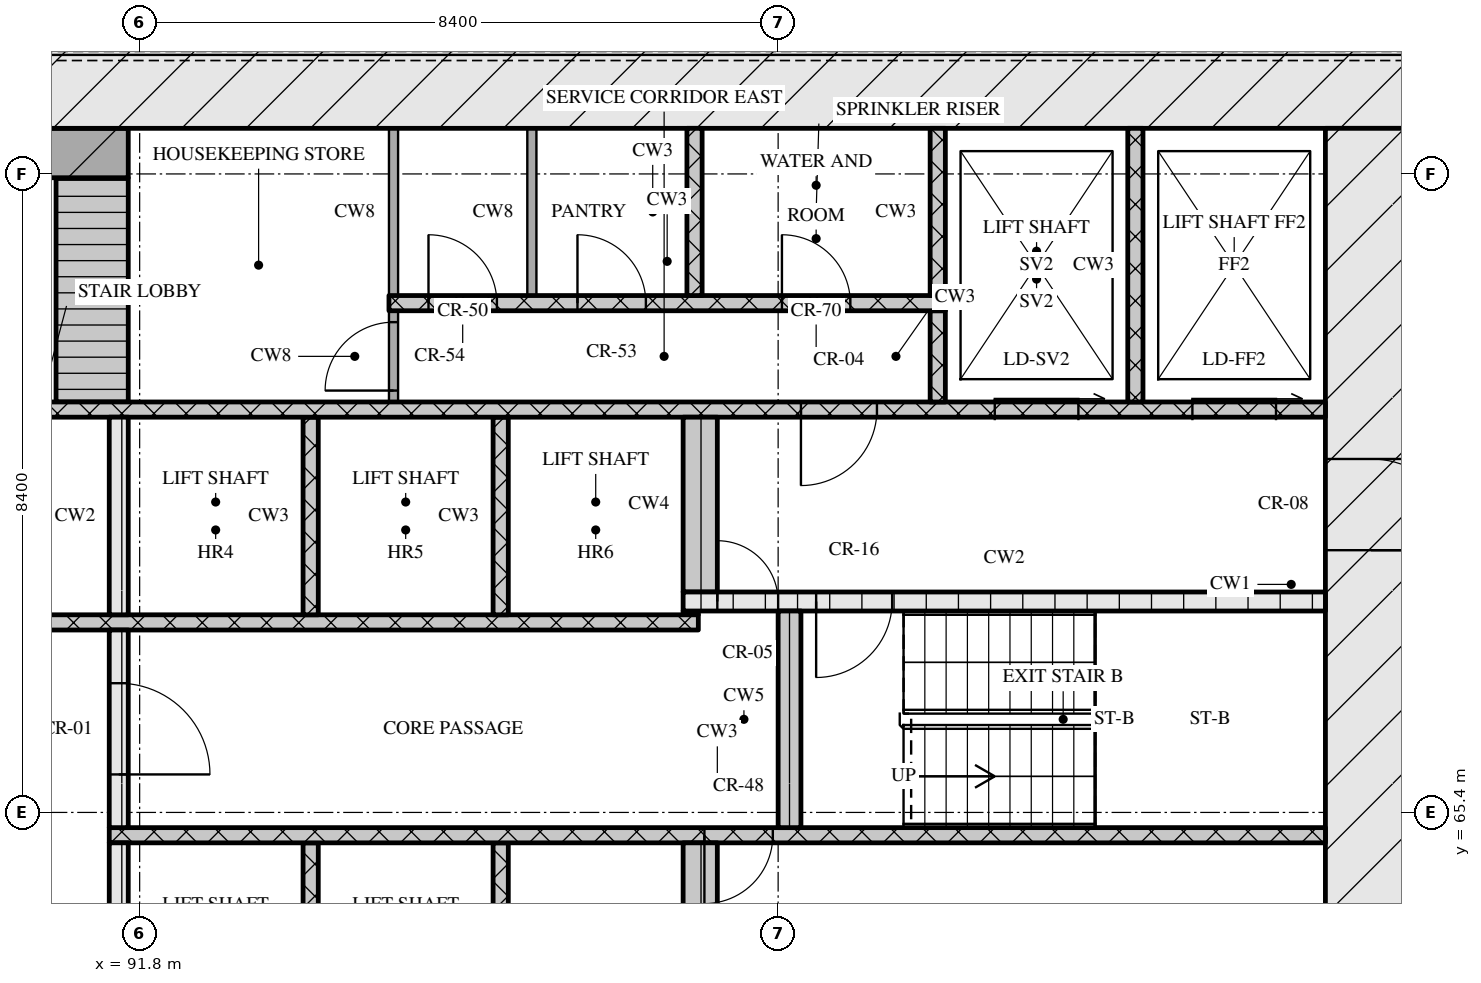
"""IFC4 building model, lengths in metres.
Left out: names, types, materials, properties, quantities, classifications, styles, units other than length and angle.
Written with IfcOpenShell. Run it as: python <this file> out.ifc"""

import sys

from ifc_helpers import new_model, si_unit, direction, frame, frame_2d, origin, place, context, subcontext, project, spatial, rectangle, extrude, element, fill, save


model = new_model("IFC4")
c1 = context("Model", 3, precision=1e-05, world=origin(), true_north=direction((0.0, 1.0)))
c2 = subcontext(c1, "Body", "Model", "MODEL_VIEW")
j1 = project(units=[si_unit("LENGTHUNIT", "METRE"), si_unit("PLANEANGLEUNIT", "RADIAN")], contexts=[c1])
p1 = place(None, origin())
s1 = spatial("IfcSite", under=j1, at=p1, CompositionType="ELEMENT")
p2 = place(p1, origin())
s2 = spatial("IfcBuilding", under=s1, at=p2, CompositionType="ELEMENT")
p3 = place(p2, frame((0.0, 0.0, 58.8)))
s3 = spatial("IfcBuildingStorey", under=s2, at=p3, CompositionType="ELEMENT", Elevation=58.8)
p4 = place(p3, frame((66.6, 75.0, 0.0), z_axis=(0.0, 0.0, 1.0), x_axis=(1.0, 0.0, 0.0)))
e1 = element("IfcWall", 1, at=p4, inside=s3, PredefinedType="SOLIDWALL", context=c2, shape_type="SweptSolid", body=[
    extrude(rectangle(XDim=42.0, YDim=1.2, at=frame_2d((21.0, 0.0))), origin(), (0.0, 0.0, 1.0), 3.32),
])
p5 = place(p3, frame((108.0, 62.4, 0.0), z_axis=(0.0, 0.0, 1.0), x_axis=(0.0, 1.0, 0.0)))
e2 = element("IfcWall", 2, at=p5, inside=s3, PredefinedType="SOLIDWALL", context=c2, shape_type="SweptSolid", body=[
    extrude(rectangle(XDim=12.0, YDim=1.2, at=frame_2d((6.0, 0.0))), origin(), (0.0, 0.0, 1.0), 3.32),
])
p6 = place(p5, frame((6.45, 0.0, 0.0)))
e3 = element("IfcOpeningElement", 3, at=p6, cuts=e2, PredefinedType="OPENING", context=c2, shape_type="SweptSolid", body=[
    extrude(rectangle(XDim=1.2, YDim=2.1, at=frame_2d((0.6, 1.05))), frame((0.0, 0.61, 0.0), z_axis=(0.0, -1.0, 0.0), x_axis=(1.0, 0.0, 0.0)), (0.0, 0.0, 1.0), 1.22),
])
p7 = place(p3, frame((91.525, 62.4, 0.0), z_axis=(0.0, 0.0, 1.0), x_axis=(0.0, 1.0, 0.0)))
e4 = element("IfcWall", 4, at=p7, inside=s3, PredefinedType="SOLIDWALL", context=c2, shape_type="SweptSolid", body=[
    extrude(rectangle(XDim=2.6, YDim=0.25, at=frame_2d((1.3, 0.0))), origin(), (0.0, 0.0, 1.0), 3.32),
])
for number, where, z_axis, x_axis in (
    (5, (94.05, 62.4, 0.0), (0.0, 0.0, 1.0), (0.0, 1.0, 0.0)),
    (6, (96.55, 62.4, 0.0), (0.0, 0.0, 1.0), (0.0, 1.0, 0.0)),
):
    element("IfcWall", number, at=place(p3, frame(where, z_axis=z_axis, x_axis=x_axis)), inside=s3, PredefinedType="SOLIDWALL", context=c2, shape_type="SweptSolid", body=[
        extrude(rectangle(XDim=2.6, YDim=0.2, at=frame_2d((1.3, 0.0))), origin(), (0.0, 0.0, 1.0), 3.32),
    ])
p8 = place(p3, frame((99.175, 62.4, 0.0), z_axis=(0.0, 0.0, 1.0), x_axis=(0.0, 1.0, 0.0)))
e7 = element("IfcWall", 7, at=p8, inside=s3, PredefinedType="SOLIDWALL", context=c2, shape_type="SweptSolid", body=[
    extrude(rectangle(XDim=2.6, YDim=0.45, at=frame_2d((1.3, 0.0))), origin(), (0.0, 0.0, 1.0), 3.32),
])
p9 = place(p3, frame((91.4, 65.1, 0.0), z_axis=(0.0, 0.0, 1.0), x_axis=(1.0, 0.0, 0.0)))
e8 = element("IfcWall", 8, at=p9, inside=s3, PredefinedType="SOLIDWALL", context=c2, shape_type="SweptSolid", body=[
    extrude(rectangle(XDim=16.0, YDim=0.2, at=frame_2d((8.0, 0.0))), origin(), (0.0, 0.0, 1.0), 3.32),
])
p10 = place(p9, frame((7.83, 0.0, 0.0)))
e9 = element("IfcOpeningElement", 9, at=p10, cuts=e8, PredefinedType="OPENING", context=c2, shape_type="SweptSolid", body=[
    extrude(rectangle(XDim=0.9, YDim=2.1, at=frame_2d((0.45, 1.05))), frame((0.0, 0.11, 0.0), z_axis=(0.0, -1.0, 0.0), x_axis=(1.0, 0.0, 0.0)), (0.0, 0.0, 1.0), 0.22),
])
p11 = place(p3, frame((91.525, 65.2, 0.0), z_axis=(0.0, 0.0, 1.0), x_axis=(0.0, 1.0, 0.0)))
e10 = element("IfcWall", 10, at=p11, inside=s3, PredefinedType="SOLIDWALL", context=c2, shape_type="SweptSolid", body=[
    extrude(rectangle(XDim=2.6, YDim=0.25, at=frame_2d((1.3, 0.0))), origin(), (0.0, 0.0, 1.0), 3.32),
])
p12 = place(p11, frame((0.7, 0.0, 0.0)))
e11 = element("IfcOpeningElement", 11, at=p12, cuts=e10, PredefinedType="OPENING", context=c2, shape_type="SweptSolid", body=[
    extrude(rectangle(XDim=1.2, YDim=2.1, at=frame_2d((0.6, 1.05))), frame((0.0, 0.135, 0.0), z_axis=(0.0, -1.0, 0.0), x_axis=(1.0, 0.0, 0.0)), (0.0, 0.0, 1.0), 0.27),
])
p13 = place(p3, frame((100.35, 65.2, 0.0), z_axis=(0.0, 0.0, 1.0), x_axis=(0.0, 1.0, 0.0)))
e12 = element("IfcWall", 12, at=p13, inside=s3, PredefinedType="SOLIDWALL", context=c2, shape_type="SweptSolid", body=[
    extrude(rectangle(XDim=2.85, YDim=0.3, at=frame_2d((1.425, 0.0))), origin(), (0.0, 0.0, 1.0), 3.32),
])
p14 = place(p3, frame((76.05, 67.9, 0.0), z_axis=(0.0, 0.0, 1.0), x_axis=(1.0, 0.0, 0.0)))
e13 = element("IfcWall", 13, at=p14, inside=s3, PredefinedType="SOLIDWALL", context=c2, shape_type="SweptSolid", body=[
    extrude(rectangle(XDim=23.1, YDim=0.2, at=frame_2d((11.55, 0.0))), origin(), (0.0, 0.0, 1.0), 3.32),
])
p15 = place(p14, frame((0.6, 0.0, 0.0)))
e14 = element("IfcOpeningElement", 14, at=p15, cuts=e13, PredefinedType="OPENING", context=c2, shape_type="SweptSolid", body=[
    extrude(rectangle(XDim=1.1, YDim=2.1, at=frame_2d((0.55, 1.05))), frame((0.0, 0.11, 0.0), z_axis=(0.0, -1.0, 0.0), x_axis=(1.0, 0.0, 0.0)), (0.0, 0.0, 1.0), 0.22),
])
p16 = place(p14, frame((3.1, 0.0, 0.0)))
e15 = element("IfcOpeningElement", 15, at=p16, cuts=e13, PredefinedType="OPENING", context=c2, shape_type="SweptSolid", body=[
    extrude(rectangle(XDim=1.1, YDim=2.1, at=frame_2d((0.55, 1.05))), frame((0.0, 0.11, 0.0), z_axis=(0.0, -1.0, 0.0), x_axis=(1.0, 0.0, 0.0)), (0.0, 0.0, 1.0), 0.22),
])
p17 = place(p14, frame((5.6, 0.0, 0.0)))
e16 = element("IfcOpeningElement", 16, at=p17, cuts=e13, PredefinedType="OPENING", context=c2, shape_type="SweptSolid", body=[
    extrude(rectangle(XDim=1.1, YDim=2.1, at=frame_2d((0.55, 1.05))), frame((0.0, 0.11, 0.0), z_axis=(0.0, -1.0, 0.0), x_axis=(1.0, 0.0, 0.0)), (0.0, 0.0, 1.0), 0.22),
])
p18 = place(p14, frame((8.45, 0.0, 0.0)))
e17 = element("IfcOpeningElement", 17, at=p18, cuts=e13, PredefinedType="OPENING", context=c2, shape_type="SweptSolid", body=[
    extrude(rectangle(XDim=0.9, YDim=2.1, at=frame_2d((0.45, 1.05))), frame((0.0, 0.11, 0.0), z_axis=(0.0, -1.0, 0.0), x_axis=(1.0, 0.0, 0.0)), (0.0, 0.0, 1.0), 0.22),
])
p19 = place(p14, frame((10.91, 0.0, 0.0)))
e18 = element("IfcOpeningElement", 18, at=p19, cuts=e13, PredefinedType="OPENING", context=c2, shape_type="SweptSolid", body=[
    extrude(rectangle(XDim=0.9, YDim=2.1, at=frame_2d((0.45, 1.05))), frame((0.0, 0.11, 0.0), z_axis=(0.0, -1.0, 0.0), x_axis=(1.0, 0.0, 0.0)), (0.0, 0.0, 1.0), 0.22),
])
p20 = place(p14, frame((13.55, 0.0, 0.0)))
e19 = element("IfcOpeningElement", 19, at=p20, cuts=e13, PredefinedType="OPENING", context=c2, shape_type="SweptSolid", body=[
    extrude(rectangle(XDim=1.0, YDim=2.1, at=frame_2d((0.5, 1.05))), frame((0.0, 0.11, 0.0), z_axis=(0.0, -1.0, 0.0), x_axis=(1.0, 0.0, 0.0)), (0.0, 0.0, 1.0), 0.22),
])
p21 = place(p3, frame((91.525, 68.0, 0.0), z_axis=(0.0, 0.0, 1.0), x_axis=(0.0, 1.0, 0.0)))
e20 = element("IfcWall", 20, at=p21, inside=s3, PredefinedType="SOLIDWALL", context=c2, shape_type="SweptSolid", body=[
    extrude(rectangle(XDim=2.6, YDim=0.25, at=frame_2d((1.3, 0.0))), origin(), (0.0, 0.0, 1.0), 3.32),
])
for number, where, z_axis, x_axis in (
    (21, (94.05, 68.0, 0.0), (0.0, 0.0, 1.0), (0.0, 1.0, 0.0)),
    (22, (96.55, 68.0, 0.0), (0.0, 0.0, 1.0), (0.0, 1.0, 0.0)),
):
    element("IfcWall", number, at=place(p3, frame(where, z_axis=z_axis, x_axis=x_axis)), inside=s3, PredefinedType="SOLIDWALL", context=c2, shape_type="SweptSolid", body=[
        extrude(rectangle(XDim=2.6, YDim=0.2, at=frame_2d((1.3, 0.0))), origin(), (0.0, 0.0, 1.0), 3.32),
    ])
p22 = place(p3, frame((98.95, 68.025, 0.0), z_axis=(0.0, 0.0, 1.0), x_axis=(1.0, 0.0, 0.0)))
e23 = element("IfcWall", 23, at=p22, inside=s3, PredefinedType="SOLIDWALL", context=c2, shape_type="SweptSolid", body=[
    extrude(rectangle(XDim=0.2, YDim=0.05, at=frame_2d((0.1, 0.0))), origin(), (0.0, 0.0, 1.0), 3.32),
])
p23 = place(p3, frame((98.95, 68.175, 0.0), z_axis=(0.0, 0.0, 1.0), x_axis=(1.0, 0.0, 0.0)))
e24 = element("IfcWall", 24, at=p23, inside=s3, PredefinedType="SOLIDWALL", context=c2, shape_type="SweptSolid", body=[
    extrude(rectangle(XDim=8.45, YDim=0.25, at=frame_2d((4.225, 0.0))), origin(), (0.0, 0.0, 1.0), 3.32),
])
p24 = place(p23, frame((0.45, 0.0, 0.0)))
e25 = element("IfcOpeningElement", 25, at=p24, cuts=e24, PredefinedType="OPENING", context=c2, shape_type="SweptSolid", body=[
    extrude(rectangle(XDim=0.8, YDim=2.1, at=frame_2d((0.4, 1.05))), frame((0.0, 0.135, 0.0), z_axis=(0.0, -1.0, 0.0), x_axis=(1.0, 0.0, 0.0)), (0.0, 0.0, 1.0), 0.27),
])
p25 = place(p23, frame((1.75, 0.0, 0.0)))
e26 = element("IfcOpeningElement", 26, at=p25, cuts=e24, PredefinedType="OPENING", context=c2, shape_type="SweptSolid", body=[
    extrude(rectangle(XDim=1.0, YDim=2.1, at=frame_2d((0.5, 1.05))), frame((0.0, 0.135, 0.0), z_axis=(0.0, -1.0, 0.0), x_axis=(1.0, 0.0, 0.0)), (0.0, 0.0, 1.0), 0.27),
])
p26 = place(p3, frame((99.175, 68.3, 0.0), z_axis=(0.0, 0.0, 1.0), x_axis=(0.0, 1.0, 0.0)))
e27 = element("IfcWall", 27, at=p26, inside=s3, PredefinedType="SOLIDWALL", context=c2, shape_type="SweptSolid", body=[
    extrude(rectangle(XDim=2.3, YDim=0.45, at=frame_2d((1.15, 0.0))), origin(), (0.0, 0.0, 1.0), 3.32),
])
p27 = place(p3, frame((67.8, 70.7, 0.0), z_axis=(0.0, 0.0, 1.0), x_axis=(1.0, 0.0, 0.0)))
e28 = element("IfcWall", 28, at=p27, inside=s3, PredefinedType="SOLIDWALL", context=c2, shape_type="SweptSolid", body=[
    extrude(rectangle(XDim=39.6, YDim=0.2, at=frame_2d((19.8, 0.0))), origin(), (0.0, 0.0, 1.0), 3.32),
])
p28 = place(p27, frame((0.65, 0.0, 0.0)))
e29 = element("IfcOpeningElement", 29, at=p28, cuts=e28, PredefinedType="OPENING", context=c2, shape_type="SweptSolid", body=[
    extrude(rectangle(XDim=1.1, YDim=2.1, at=frame_2d((0.55, 1.05))), frame((0.0, 0.11, 0.0), z_axis=(0.0, -1.0, 0.0), x_axis=(1.0, 0.0, 0.0)), (0.0, 0.0, 1.0), 0.22),
])
p29 = place(p27, frame((3.25, 0.0, 0.0)))
e30 = element("IfcOpeningElement", 30, at=p29, cuts=e28, PredefinedType="OPENING", context=c2, shape_type="SweptSolid", body=[
    extrude(rectangle(XDim=1.1, YDim=2.1, at=frame_2d((0.55, 1.05))), frame((0.0, 0.11, 0.0), z_axis=(0.0, -1.0, 0.0), x_axis=(1.0, 0.0, 0.0)), (0.0, 0.0, 1.0), 0.22),
])
p30 = place(p27, frame((5.9, 0.0, 0.0)))
e31 = element("IfcOpeningElement", 31, at=p30, cuts=e28, PredefinedType="OPENING", context=c2, shape_type="SweptSolid", body=[
    extrude(rectangle(XDim=1.0, YDim=2.1, at=frame_2d((0.5, 1.05))), frame((0.0, 0.11, 0.0), z_axis=(0.0, -1.0, 0.0), x_axis=(1.0, 0.0, 0.0)), (0.0, 0.0, 1.0), 0.22),
])
p31 = place(p27, frame((21.7, 0.0, 0.0)))
e32 = element("IfcOpeningElement", 32, at=p31, cuts=e28, PredefinedType="OPENING", context=c2, shape_type="SweptSolid", body=[
    extrude(rectangle(XDim=1.0, YDim=2.1, at=frame_2d((0.5, 1.05))), frame((0.0, 0.11, 0.0), z_axis=(0.0, -1.0, 0.0), x_axis=(1.0, 0.0, 0.0)), (0.0, 0.0, 1.0), 0.22),
])
p32 = place(p27, frame((32.7, 0.0, 0.0)))
e33 = element("IfcOpeningElement", 33, at=p32, cuts=e28, PredefinedType="OPENING", context=c2, shape_type="SweptSolid", body=[
    extrude(rectangle(XDim=1.0, YDim=2.1, at=frame_2d((0.5, 1.05))), frame((0.0, 0.11, 0.0), z_axis=(0.0, -1.0, 0.0), x_axis=(1.0, 0.0, 0.0)), (0.0, 0.0, 1.0), 0.22),
])
p33 = place(p27, frame((35.25, 0.0, 0.0)))
e34 = element("IfcOpeningElement", 34, at=p33, cuts=e28, PredefinedType="OPENING", context=c2, shape_type="SweptSolid", body=[
    extrude(rectangle(XDim=1.1, YDim=2.1, at=frame_2d((0.55, 1.05))), frame((0.0, 0.11, 0.0), z_axis=(0.0, -1.0, 0.0), x_axis=(1.0, 0.0, 0.0)), (0.0, 0.0, 1.0), 0.22),
])
p34 = place(p27, frame((37.85, 0.0, 0.0)))
e35 = element("IfcOpeningElement", 35, at=p34, cuts=e28, PredefinedType="OPENING", context=c2, shape_type="SweptSolid", body=[
    extrude(rectangle(XDim=1.1, YDim=2.1, at=frame_2d((0.55, 1.05))), frame((0.0, 0.11, 0.0), z_axis=(0.0, -1.0, 0.0), x_axis=(1.0, 0.0, 0.0)), (0.0, 0.0, 1.0), 0.22),
])
p35 = place(p3, frame((91.175, 70.8, 0.0), z_axis=(0.0, 0.0, 1.0), x_axis=(0.0, 1.0, 0.0)))
e36 = element("IfcWall", 36, at=p35, inside=s3, PredefinedType="SOLIDWALL", context=c2, shape_type="SweptSolid", body=[
    extrude(rectangle(XDim=2.95, YDim=0.95, at=frame_2d((1.475, 0.0))), origin(), (0.0, 0.0, 1.0), 3.32),
])
p36 = place(p3, frame((95.14, 70.8, 0.0), z_axis=(0.0, 0.0, 1.0), x_axis=(0.0, 1.0, 0.0)))
e37 = element("IfcWall", 37, at=p36, inside=s3, PredefinedType="PARTITIONING", context=c2, shape_type="SweptSolid", body=[
    extrude(rectangle(XDim=1.2, YDim=0.12, at=frame_2d((0.6, 0.0))), origin(), (0.0, 0.0, 1.0), 3.32),
])
p37 = place(p36, frame((0.15, 0.0, 0.0)))
e38 = element("IfcOpeningElement", 38, at=p37, cuts=e37, PredefinedType="OPENING", context=c2, shape_type="SweptSolid", body=[
    extrude(rectangle(XDim=0.9, YDim=2.1, at=frame_2d((0.45, 1.05))), frame((0.0, 0.07, 0.0), z_axis=(0.0, -1.0, 0.0), x_axis=(1.0, 0.0, 0.0)), (0.0, 0.0, 1.0), 0.14),
])
p38 = place(p3, frame((102.3, 70.8, 0.0), z_axis=(0.0, 0.0, 1.0), x_axis=(0.0, 1.0, 0.0)))
e39 = element("IfcWall", 39, at=p38, inside=s3, PredefinedType="SOLIDWALL", context=c2, shape_type="SweptSolid", body=[
    extrude(rectangle(XDim=1.2, YDim=0.2, at=frame_2d((0.6, 0.0))), origin(), (0.0, 0.0, 1.0), 3.32),
])
p39 = place(p3, frame((104.9, 70.8, 0.0), z_axis=(0.0, 0.0, 1.0), x_axis=(0.0, 1.0, 0.0)))
e40 = element("IfcWall", 40, at=p39, inside=s3, PredefinedType="SOLIDWALL", context=c2, shape_type="SweptSolid", body=[
    extrude(rectangle(XDim=3.6, YDim=0.2, at=frame_2d((1.8, 0.0))), origin(), (0.0, 0.0, 1.0), 3.32),
])
p40 = place(p3, frame((95.08, 72.1, 0.0), z_axis=(0.0, 0.0, 1.0), x_axis=(1.0, 0.0, 0.0)))
e41 = element("IfcWall", 41, at=p40, inside=s3, PredefinedType="SOLIDWALL", context=c2, shape_type="SweptSolid", body=[
    extrude(rectangle(XDim=7.32, YDim=0.2, at=frame_2d((3.66, 0.0))), origin(), (0.0, 0.0, 1.0), 3.32),
])
p41 = place(p40, frame((0.52, 0.0, 0.0)))
e42 = element("IfcOpeningElement", 42, at=p41, cuts=e41, PredefinedType="OPENING", context=c2, shape_type="SweptSolid", body=[
    extrude(rectangle(XDim=0.9, YDim=2.1, at=frame_2d((0.45, 1.05))), frame((0.0, 0.11, 0.0), z_axis=(0.0, -1.0, 0.0), x_axis=(1.0, 0.0, 0.0)), (0.0, 0.0, 1.0), 0.22),
])
p42 = place(p40, frame((2.48, 0.0, 0.0)))
e43 = element("IfcOpeningElement", 43, at=p42, cuts=e41, PredefinedType="OPENING", context=c2, shape_type="SweptSolid", body=[
    extrude(rectangle(XDim=0.9, YDim=2.1, at=frame_2d((0.45, 1.05))), frame((0.0, 0.11, 0.0), z_axis=(0.0, -1.0, 0.0), x_axis=(1.0, 0.0, 0.0)), (0.0, 0.0, 1.0), 0.22),
])
p43 = place(p40, frame((5.17, 0.0, 0.0)))
e44 = element("IfcOpeningElement", 44, at=p43, cuts=e41, PredefinedType="OPENING", context=c2, shape_type="SweptSolid", body=[
    extrude(rectangle(XDim=0.9, YDim=2.1, at=frame_2d((0.45, 1.05))), frame((0.0, 0.11, 0.0), z_axis=(0.0, -1.0, 0.0), x_axis=(1.0, 0.0, 0.0)), (0.0, 0.0, 1.0), 0.22),
])
for number, where, z_axis, x_axis in (
    (45, (95.14, 72.2, 0.0), (0.0, 0.0, 1.0), (0.0, 1.0, 0.0)),
    (46, (96.96, 72.2, 0.0), (0.0, 0.0, 1.0), (0.0, 1.0, 0.0)),
):
    element("IfcWall", number, at=place(p3, frame(where, z_axis=z_axis, x_axis=x_axis)), inside=s3, PredefinedType="PARTITIONING", context=c2, shape_type="SweptSolid", body=[
        extrude(rectangle(XDim=2.2, YDim=0.12, at=frame_2d((1.1, 0.0))), origin(), (0.0, 0.0, 1.0), 3.32),
    ])
for number, where, z_axis, x_axis in (
    (47, (99.1, 72.2, 0.0), (0.0, 0.0, 1.0), (0.0, 1.0, 0.0)),
    (48, (102.3, 72.2, 0.0), (0.0, 0.0, 1.0), (0.0, 1.0, 0.0)),
):
    element("IfcWall", number, at=place(p3, frame(where, z_axis=z_axis, x_axis=x_axis)), inside=s3, PredefinedType="SOLIDWALL", context=c2, shape_type="SweptSolid", body=[
        extrude(rectangle(XDim=2.2, YDim=0.2, at=frame_2d((1.1, 0.0))), origin(), (0.0, 0.0, 1.0), 3.32),
    ])
p44 = place(p3, frame((83.55, 74.075, 0.0), z_axis=(0.0, 0.0, 1.0), x_axis=(1.0, 0.0, 0.0)))
e49 = element("IfcWall", 49, at=p44, inside=s3, PredefinedType="SOLIDWALL", context=c2, shape_type="SweptSolid", body=[
    extrude(rectangle(XDim=8.1, YDim=0.65, at=frame_2d((4.05, 0.0))), origin(), (0.0, 0.0, 1.0), 3.32),
])
p45 = place(p10, origin())
e50 = element("IfcDoor", 50, at=p45, inside=s3, OperationType="SINGLE_SWING_RIGHT", PredefinedType="DOOR", context=c2, shape_type="SweptSolid", body=[
    extrude(rectangle(XDim=0.9, YDim=2.1, at=frame_2d((0.45, 1.05))), frame((0.0, 0.025, 0.0), z_axis=(0.0, -1.0, 0.0), x_axis=(1.0, 0.0, 0.0)), (0.0, 0.0, 1.0), 0.05),
])
fill(e9, e50)
p46 = place(p12, origin())
e51 = element("IfcDoor", 51, at=p46, inside=s3, OperationType="SINGLE_SWING_RIGHT", PredefinedType="DOOR", context=c2, shape_type="SweptSolid", body=[
    extrude(rectangle(XDim=1.2, YDim=2.1, at=frame_2d((0.6, 1.05))), frame((0.0, 0.025, 0.0), z_axis=(0.0, -1.0, 0.0), x_axis=(1.0, 0.0, 0.0)), (0.0, 0.0, 1.0), 0.05),
])
fill(e11, e51)
p47 = place(p24, origin())
e52 = element("IfcDoor", 52, at=p47, inside=s3, OperationType="SINGLE_SWING_LEFT", PredefinedType="DOOR", context=c2, shape_type="SweptSolid", body=[
    extrude(rectangle(XDim=0.8, YDim=2.1, at=frame_2d((0.4, 1.05))), frame((0.0, 0.025, 0.0), z_axis=(0.0, -1.0, 0.0), x_axis=(1.0, 0.0, 0.0)), (0.0, 0.0, 1.0), 0.05),
])
fill(e25, e52)
p48 = place(p25, origin())
e53 = element("IfcDoor", 53, at=p48, inside=s3, OperationType="SINGLE_SWING_RIGHT", PredefinedType="DOOR", context=c2, shape_type="SweptSolid", body=[
    extrude(rectangle(XDim=1.0, YDim=2.1, at=frame_2d((0.5, 1.05))), frame((0.0, 0.025, 0.0), z_axis=(0.0, -1.0, 0.0), x_axis=(1.0, 0.0, 0.0)), (0.0, 0.0, 1.0), 0.05),
])
fill(e26, e53)
p49 = place(p6, origin())
e54 = element("IfcDoor", 54, at=p49, inside=s3, OperationType="SINGLE_SWING_RIGHT", PredefinedType="DOOR", context=c2, shape_type="SweptSolid", body=[
    extrude(rectangle(XDim=1.2, YDim=2.1, at=frame_2d((0.6, 1.05))), frame((0.0, 0.025, 0.0), z_axis=(0.0, -1.0, 0.0), x_axis=(1.0, 0.0, 0.0)), (0.0, 0.0, 1.0), 0.05),
])
fill(e3, e54)
p50 = place(p32, origin())
e55 = element("IfcDoor", 55, at=p50, inside=s3, OperationType="SINGLE_SWING_RIGHT", PredefinedType="DOOR", context=c2, shape_type="SweptSolid", body=[
    extrude(rectangle(XDim=1.0, YDim=2.1, at=frame_2d((0.5, 1.05))), frame((0.0, 0.025, 0.0), z_axis=(0.0, -1.0, 0.0), x_axis=(1.0, 0.0, 0.0)), (0.0, 0.0, 1.0), 0.05),
])
fill(e33, e55)
p51 = place(p33, origin())
e56 = element("IfcDoor", 56, at=p51, inside=s3, OperationType="SLIDING_TO_RIGHT", PredefinedType="DOOR", context=c2, shape_type="SweptSolid", body=[
    extrude(rectangle(XDim=1.1, YDim=2.1, at=frame_2d((0.55, 1.05))), frame((0.0, 0.025, 0.0), z_axis=(0.0, -1.0, 0.0), x_axis=(1.0, 0.0, 0.0)), (0.0, 0.0, 1.0), 0.05),
])
fill(e34, e56)
p52 = place(p34, origin())
e57 = element("IfcDoor", 57, at=p52, inside=s3, OperationType="SLIDING_TO_RIGHT", PredefinedType="DOOR", context=c2, shape_type="SweptSolid", body=[
    extrude(rectangle(XDim=1.1, YDim=2.1, at=frame_2d((0.55, 1.05))), frame((0.0, 0.025, 0.0), z_axis=(0.0, -1.0, 0.0), x_axis=(1.0, 0.0, 0.0)), (0.0, 0.0, 1.0), 0.05),
])
fill(e35, e57)
p53 = place(p37, origin())
e58 = element("IfcDoor", 58, at=p53, inside=s3, OperationType="SINGLE_SWING_LEFT", PredefinedType="DOOR", context=c2, shape_type="SweptSolid", body=[
    extrude(rectangle(XDim=0.9, YDim=2.1, at=frame_2d((0.45, 1.05))), frame((0.0, 0.025, 0.0), z_axis=(0.0, -1.0, 0.0), x_axis=(1.0, 0.0, 0.0)), (0.0, 0.0, 1.0), 0.05),
])
fill(e38, e58)
p54 = place(p41, origin())
e59 = element("IfcDoor", 59, at=p54, inside=s3, OperationType="SINGLE_SWING_LEFT", PredefinedType="DOOR", context=c2, shape_type="SweptSolid", body=[
    extrude(rectangle(XDim=0.9, YDim=2.1, at=frame_2d((0.45, 1.05))), frame((0.0, 0.025, 0.0), z_axis=(0.0, -1.0, 0.0), x_axis=(1.0, 0.0, 0.0)), (0.0, 0.0, 1.0), 0.05),
])
fill(e42, e59)
p55 = place(p42, origin())
e60 = element("IfcDoor", 60, at=p55, inside=s3, OperationType="SINGLE_SWING_LEFT", PredefinedType="DOOR", context=c2, shape_type="SweptSolid", body=[
    extrude(rectangle(XDim=0.9, YDim=2.1, at=frame_2d((0.45, 1.05))), frame((0.0, 0.025, 0.0), z_axis=(0.0, -1.0, 0.0), x_axis=(1.0, 0.0, 0.0)), (0.0, 0.0, 1.0), 0.05),
])
fill(e43, e60)
p56 = place(p43, origin())
e61 = element("IfcDoor", 61, at=p56, inside=s3, OperationType="SINGLE_SWING_LEFT", PredefinedType="DOOR", context=c2, shape_type="SweptSolid", body=[
    extrude(rectangle(XDim=0.9, YDim=2.1, at=frame_2d((0.45, 1.05))), frame((0.0, 0.025, 0.0), z_axis=(0.0, -1.0, 0.0), x_axis=(1.0, 0.0, 0.0)), (0.0, 0.0, 1.0), 0.05),
])
fill(e44, e61)
save(model, sys.argv[1])
